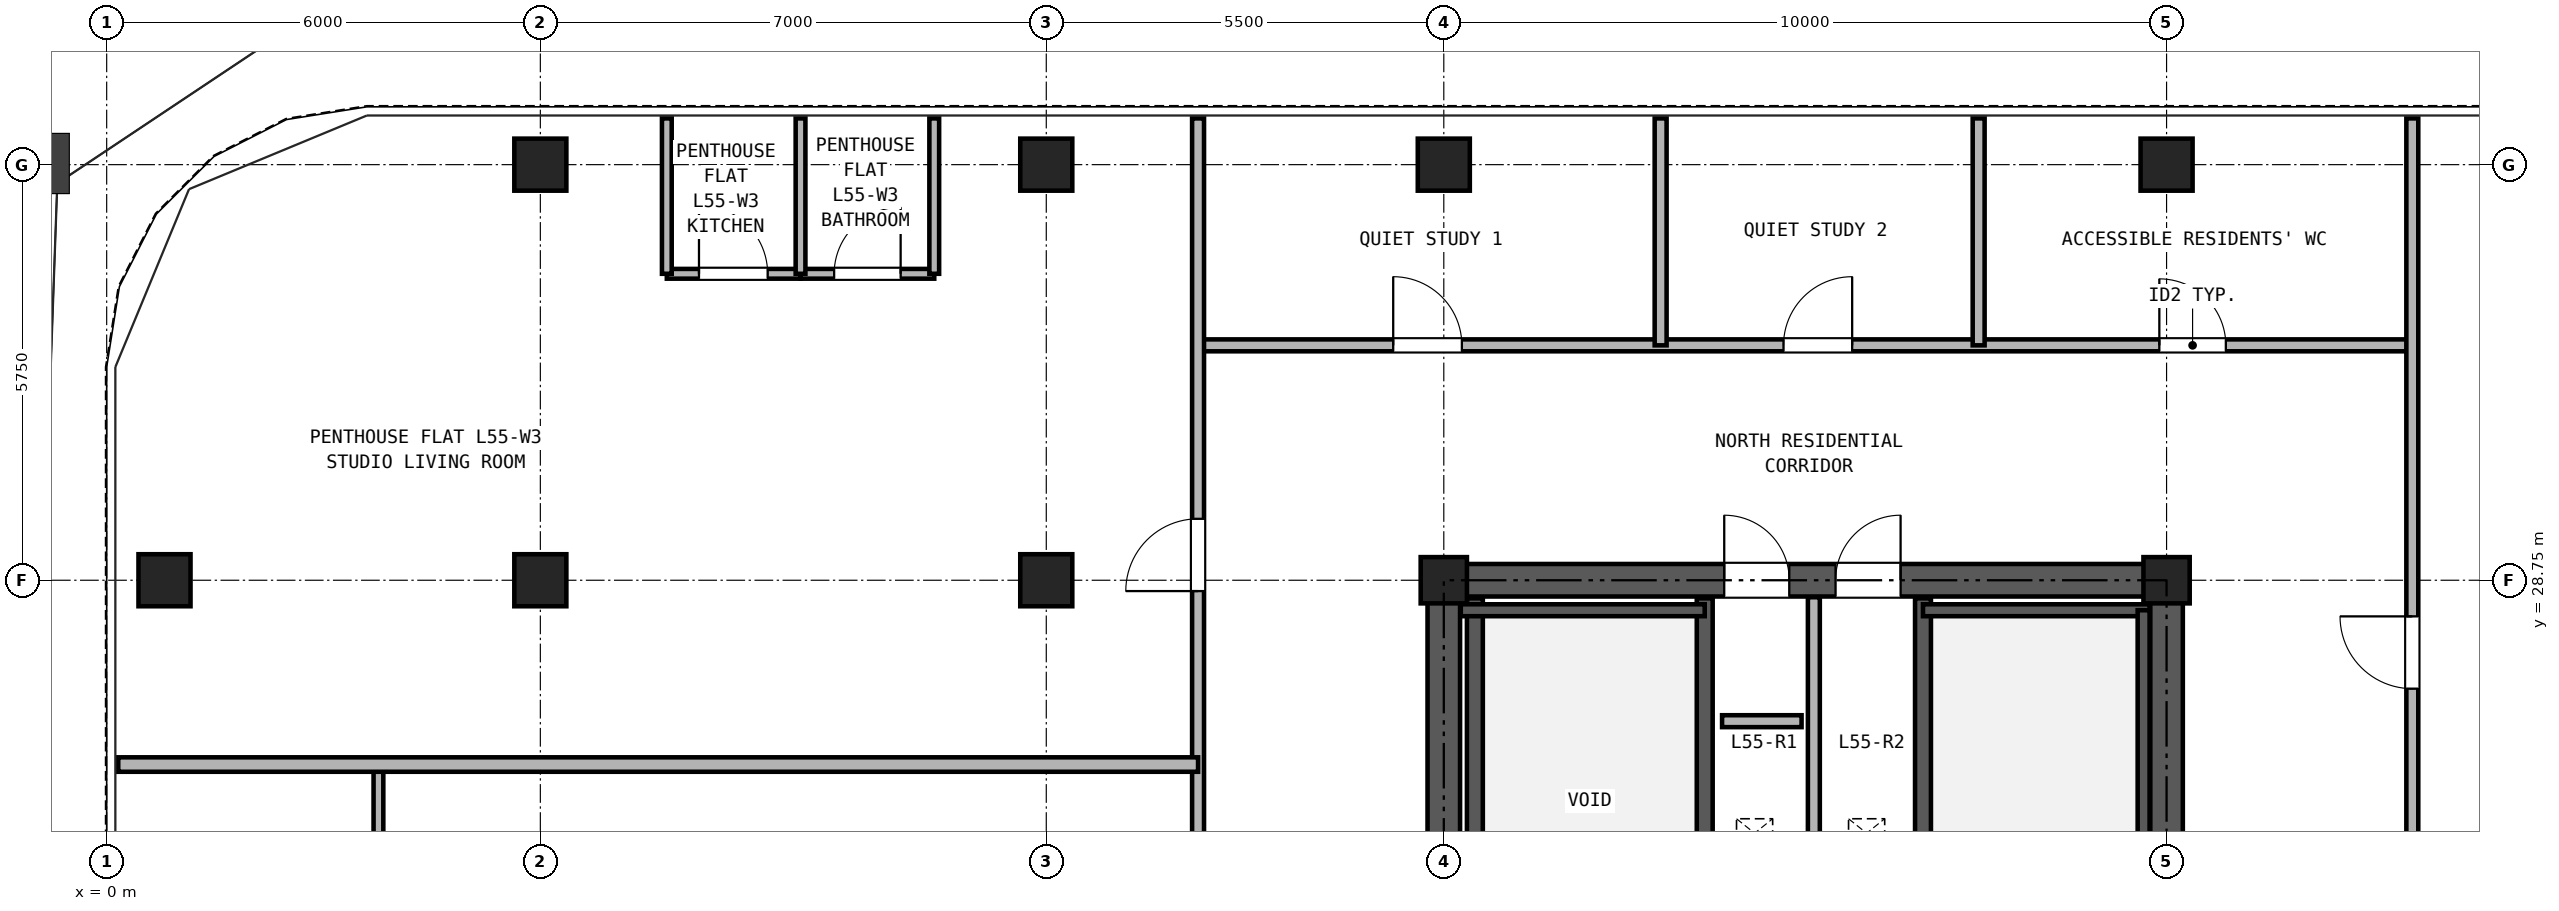
"""IFC4 building model, lengths in metres.
Left out: names, types, materials, properties, quantities, classifications, styles, units other than length and angle.
Written with IfcOpenShell. Run it as: python <this file> out.ifc"""

import sys

from ifc_helpers import new_model, si_unit, direction, frame, frame_2d, origin, origin_2d, place, context, subcontext, project, spatial, rectangle, hollow_rectangle, extrude, source, transform, mapped, element, fill, save


model = new_model("IFC4")
c1 = context("Model", 3, precision=1e-05, world=origin(), true_north=direction((0.0, 1.0)))
c2 = subcontext(c1, "Body", "Model", "MODEL_VIEW")
j1 = project(units=[si_unit("LENGTHUNIT", "METRE"), si_unit("PLANEANGLEUNIT", "RADIAN")], contexts=[c1])
p1 = place(None, origin())
s1 = spatial("IfcSite", under=j1, at=p1, CompositionType="ELEMENT")
p2 = place(p1, origin())
s2 = spatial("IfcBuilding", under=s1, at=p2, CompositionType="ELEMENT")
p3 = place(p2, frame((0.0, 0.0, 196.4)))
s3 = spatial("IfcBuildingStorey", under=s2, at=p3, CompositionType="ELEMENT", Elevation=196.4)
m1 = source(origin(), c2, "Body", "SweptSolid", [
    extrude(hollow_rectangle(XDim=0.72, YDim=0.72, WallThickness=0.04, at=origin_2d()), origin(), (0.0, 0.0, 1.0), 2.95),
])
for number, where, z_axis, x_axis in (
    (1, (6.0, 34.5, 0.0), (0.0, 0.0, 1.0), (1.0, 0.0, 0.0)),
    (2, (13.0, 34.5, 0.0), (0.0, 0.0, 1.0), (1.0, 0.0, 0.0)),
    (3, (18.5, 34.5, 0.0), (0.0, 0.0, 1.0), (1.0, 0.0, 0.0)),
    (4, (28.5, 34.5, 0.0), (0.0, 0.0, 1.0), (1.0, 0.0, 0.0)),
    (5, (0.8, 28.75, 0.0), (0.0, 0.0, 1.0), (1.0, 0.0, 0.0)),
    (6, (6.0, 28.75, 0.0), (0.0, 0.0, 1.0), (1.0, 0.0, 0.0)),
    (7, (13.0, 28.75, 0.0), (0.0, 0.0, 1.0), (1.0, 0.0, 0.0)),
):
    element("IfcColumn", number, at=place(p3, frame(where, z_axis=z_axis, x_axis=x_axis)), inside=s3, PredefinedType="COLUMN", context=c2, shape_type="MappedRepresentation", body=[
        mapped(m1, transform((0.0, 0.0, 0.0), x_axis=(1.0, 0.0, 0.0), y_axis=(0.0, 1.0, 0.0), z_axis=(0.0, 0.0, 1.0), scale=1.0)),
    ])
m2 = source(origin(), c2, "Body", "SweptSolid", [
    extrude(hollow_rectangle(XDim=0.64, YDim=0.64, WallThickness=0.035, at=origin_2d()), origin(), (0.0, 0.0, 1.0), 2.95),
])
for number, where, z_axis, x_axis in (
    (8, (18.5, 28.75, 0.0), (0.0, 0.0, 1.0), (1.0, 0.0, 0.0)),
    (9, (28.5, 28.75, 0.0), (0.0, 0.0, 1.0), (1.0, 0.0, 0.0)),
):
    element("IfcColumn", number, at=place(p3, frame(where, z_axis=z_axis, x_axis=x_axis)), inside=s3, PredefinedType="COLUMN", context=c2, shape_type="MappedRepresentation", body=[
        mapped(m2, transform((0.0, 0.0, 0.0), x_axis=(1.0, 0.0, 0.0), y_axis=(0.0, 1.0, 0.0), z_axis=(0.0, 0.0, 1.0), scale=1.0)),
    ])
p4 = place(p3, frame((18.275, 28.75, 0.0), z_axis=(0.0, 0.0, 1.0), x_axis=(1.0, 0.0, 0.0)))
e10 = element("IfcWall", 10, at=p4, inside=s3, PredefinedType="SHEAR", context=c2, shape_type="SweptSolid", body=[
    extrude(rectangle(XDim=10.45, YDim=0.45, at=frame_2d((5.225, 0.0))), origin(), (0.0, 0.0, 1.0), 2.95),
])
p5 = place(p4, frame((4.105, 0.0, 0.0)))
e11 = element("IfcOpeningElement", 11, at=p5, cuts=e10, PredefinedType="OPENING", context=c2, shape_type="SweptSolid", body=[
    extrude(rectangle(XDim=0.9, YDim=2.05, at=frame_2d((0.45, 1.025))), frame((0.0, 0.235, 0.0), z_axis=(0.0, -1.0, 0.0), x_axis=(1.0, 0.0, 0.0)), (0.0, 0.0, 1.0), 0.47),
])
p6 = place(p4, frame((5.645, 0.0, 0.0)))
e12 = element("IfcOpeningElement", 12, at=p6, cuts=e10, PredefinedType="OPENING", context=c2, shape_type="SweptSolid", body=[
    extrude(rectangle(XDim=0.9, YDim=2.05, at=frame_2d((0.45, 1.025))), frame((0.0, 0.235, 0.0), z_axis=(0.0, -1.0, 0.0), x_axis=(1.0, 0.0, 0.0)), (0.0, 0.0, 1.0), 0.47),
])
p7 = place(p3, frame((18.5, 11.725, 0.0), z_axis=(0.0, 0.0, 1.0), x_axis=(0.0, 1.0, 0.0)))
e13 = element("IfcWall", 13, at=p7, inside=s3, PredefinedType="SHEAR", context=c2, shape_type="SweptSolid", body=[
    extrude(rectangle(XDim=16.8, YDim=0.45, at=frame_2d((8.4, 0.0))), origin(), (0.0, 0.0, 1.0), 2.95),
])
p8 = place(p7, frame((7.425, 0.0, 0.0)))
e14 = element("IfcOpeningElement", 14, at=p8, cuts=e13, PredefinedType="OPENING", context=c2, shape_type="SweptSolid", body=[
    extrude(rectangle(XDim=1.15, YDim=2.2, at=frame_2d((0.575, 1.1))), frame((0.0, 0.235, 0.0), z_axis=(0.0, -1.0, 0.0), x_axis=(1.0, 0.0, 0.0)), (0.0, 0.0, 1.0), 0.47),
])
p9 = place(p3, frame((28.5, 11.725, 0.0), z_axis=(0.0, 0.0, 1.0), x_axis=(0.0, 1.0, 0.0)))
e15 = element("IfcWall", 15, at=p9, inside=s3, PredefinedType="SHEAR", context=c2, shape_type="SweptSolid", body=[
    extrude(rectangle(XDim=16.8, YDim=0.45, at=frame_2d((8.4, 0.0))), origin(), (0.0, 0.0, 1.0), 2.95),
])
p10 = place(p9, frame((7.425, 0.0, 0.0)))
e16 = element("IfcOpeningElement", 16, at=p10, cuts=e15, PredefinedType="OPENING", context=c2, shape_type="SweptSolid", body=[
    extrude(rectangle(XDim=1.15, YDim=2.2, at=frame_2d((0.575, 1.1))), frame((0.0, 0.235, 0.0), z_axis=(0.0, -1.0, 0.0), x_axis=(1.0, 0.0, 0.0)), (0.0, 0.0, 1.0), 0.47),
])
for number, where, z_axis, x_axis in (
    (17, (18.93, 21.39, 0.0), (0.0, 0.0, 1.0), (0.0, 1.0, 0.0)),
    (18, (22.11, 21.39, 0.0), (0.0, 0.0, 1.0), (0.0, 1.0, 0.0)),
    (19, (25.13, 21.39, 0.0), (0.0, 0.0, 1.0), (0.0, 1.0, 0.0)),
):
    element("IfcWall", number, at=place(p3, frame(where, z_axis=z_axis, x_axis=x_axis)), inside=s3, PredefinedType="SOLIDWALL", context=c2, shape_type="SweptSolid", body=[
        extrude(rectangle(XDim=7.11, YDim=0.22, at=frame_2d((3.555, 0.0))), origin(), (0.0, 0.0, 1.0), 2.95),
    ])
p11 = place(p3, frame((18.735, 28.335, 0.0), z_axis=(0.0, 0.0, 1.0), x_axis=(1.0, 0.0, 0.0)))
e20 = element("IfcWall", 20, at=p11, inside=s3, PredefinedType="PARTITIONING", context=c2, shape_type="SweptSolid", body=[
    extrude(rectangle(XDim=3.375, YDim=0.165, at=frame_2d((1.688, 0.0))), origin(), (0.0, 0.0, 1.0), 2.95),
])
p12 = place(p3, frame((25.13, 28.335, 0.0), z_axis=(0.0, 0.0, 1.0), x_axis=(1.0, 0.0, 0.0)))
e21 = element("IfcWall", 21, at=p12, inside=s3, PredefinedType="PARTITIONING", context=c2, shape_type="SweptSolid", body=[
    extrude(rectangle(XDim=3.135, YDim=0.165, at=frame_2d((1.567, 0.0))), origin(), (0.0, 0.0, 1.0), 2.95),
])
p13 = place(p3, frame((28.183, 21.39, 0.0), z_axis=(0.0, 0.0, 1.0), x_axis=(0.0, 1.0, 0.0)))
e22 = element("IfcWall", 22, at=p13, inside=s3, PredefinedType="PARTITIONING", context=c2, shape_type="SweptSolid", body=[
    extrude(rectangle(XDim=6.945, YDim=0.165, at=frame_2d((3.473, 0.0))), origin(), (0.0, 0.0, 1.0), 2.95),
])
p14 = place(p3, frame((23.62, 24.4, 0.0), z_axis=(0.0, 0.0, 1.0), x_axis=(0.0, 1.0, 0.0)))
e23 = element("IfcWall", 23, at=p14, inside=s3, PredefinedType="PARTITIONING", context=c2, shape_type="SweptSolid", body=[
    extrude(rectangle(XDim=4.115, YDim=0.165, at=frame_2d((2.058, 0.0))), origin(), (0.0, 0.0, 1.0), 2.95),
])
p15 = place(p3, frame((15.1, 32.0, 0.0), z_axis=(0.0, 0.0, 1.0), x_axis=(1.0, 0.0, 0.0)))
e24 = element("IfcWall", 24, at=p15, inside=s3, PredefinedType="PARTITIONING", context=c2, shape_type="SweptSolid", body=[
    extrude(rectangle(XDim=16.8, YDim=0.165, at=frame_2d((8.4, 0.0))), origin(), (0.0, 0.0, 1.0), 2.95),
])
p16 = place(p15, frame((2.7, 0.0, 0.0)))
e25 = element("IfcOpeningElement", 25, at=p16, cuts=e24, PredefinedType="OPENING", context=c2, shape_type="SweptSolid", body=[
    extrude(rectangle(XDim=0.95, YDim=2.15, at=frame_2d((0.475, 1.075))), frame((0.0, 0.093, 0.0), z_axis=(0.0, -1.0, 0.0), x_axis=(1.0, 0.0, 0.0)), (0.0, 0.0, 1.0), 0.185),
])
p17 = place(p15, frame((8.1, 0.0, 0.0)))
e26 = element("IfcOpeningElement", 26, at=p17, cuts=e24, PredefinedType="OPENING", context=c2, shape_type="SweptSolid", body=[
    extrude(rectangle(XDim=0.95, YDim=2.15, at=frame_2d((0.475, 1.075))), frame((0.0, 0.093, 0.0), z_axis=(0.0, -1.0, 0.0), x_axis=(1.0, 0.0, 0.0)), (0.0, 0.0, 1.0), 0.185),
])
p18 = place(p15, frame((13.3, 0.0, 0.0)))
e27 = element("IfcOpeningElement", 27, at=p18, cuts=e24, PredefinedType="OPENING", context=c2, shape_type="SweptSolid", body=[
    extrude(rectangle(XDim=0.92, YDim=2.1, at=frame_2d((0.46, 1.05))), frame((0.0, 0.093, 0.0), z_axis=(0.0, -1.0, 0.0), x_axis=(1.0, 0.0, 0.0)), (0.0, 0.0, 1.0), 0.185),
])
p19 = place(p3, frame((15.1, 10.6, 0.0), z_axis=(0.0, 0.0, 1.0), x_axis=(0.0, 1.0, 0.0)))
e28 = element("IfcWall", 28, at=p19, inside=s3, PredefinedType="PARTITIONING", context=c2, shape_type="SweptSolid", body=[
    extrude(rectangle(XDim=24.54, YDim=0.165, at=frame_2d((12.27, 0.0))), origin(), (0.0, 0.0, 1.0), 2.95),
])
p20 = place(p19, frame((3.3, 0.0, 0.0)))
e29 = element("IfcOpeningElement", 29, at=p20, cuts=e28, PredefinedType="OPENING", context=c2, shape_type="SweptSolid", body=[
    extrude(rectangle(XDim=1.0, YDim=2.15, at=frame_2d((0.5, 1.075))), frame((0.0, 0.093, 0.0), z_axis=(0.0, -1.0, 0.0), x_axis=(1.0, 0.0, 0.0)), (0.0, 0.0, 1.0), 0.185),
])
p21 = place(p19, frame((11.1, 0.0, 0.0)))
e30 = element("IfcOpeningElement", 30, at=p21, cuts=e28, PredefinedType="OPENING", context=c2, shape_type="SweptSolid", body=[
    extrude(rectangle(XDim=1.0, YDim=2.15, at=frame_2d((0.5, 1.075))), frame((0.0, 0.093, 0.0), z_axis=(0.0, -1.0, 0.0), x_axis=(1.0, 0.0, 0.0)), (0.0, 0.0, 1.0), 0.185),
])
p22 = place(p19, frame((18.0, 0.0, 0.0)))
e31 = element("IfcOpeningElement", 31, at=p22, cuts=e28, PredefinedType="OPENING", context=c2, shape_type="SweptSolid", body=[
    extrude(rectangle(XDim=1.0, YDim=2.15, at=frame_2d((0.5, 1.075))), frame((0.0, 0.093, 0.0), z_axis=(0.0, -1.0, 0.0), x_axis=(1.0, 0.0, 0.0)), (0.0, 0.0, 1.0), 0.185),
])
p23 = place(p3, frame((31.9, 10.6, 0.0), z_axis=(0.0, 0.0, 1.0), x_axis=(0.0, 1.0, 0.0)))
e32 = element("IfcWall", 32, at=p23, inside=s3, PredefinedType="PARTITIONING", context=c2, shape_type="SweptSolid", body=[
    extrude(rectangle(XDim=24.54, YDim=0.165, at=frame_2d((12.27, 0.0))), origin(), (0.0, 0.0, 1.0), 2.95),
])
p24 = place(p23, frame((5.95, 0.0, 0.0)))
e33 = element("IfcOpeningElement", 33, at=p24, cuts=e32, PredefinedType="OPENING", context=c2, shape_type="SweptSolid", body=[
    extrude(rectangle(XDim=1.0, YDim=2.15, at=frame_2d((0.5, 1.075))), frame((0.0, 0.093, 0.0), z_axis=(0.0, -1.0, 0.0), x_axis=(1.0, 0.0, 0.0)), (0.0, 0.0, 1.0), 0.185),
])
p25 = place(p23, frame((16.65, 0.0, 0.0)))
e34 = element("IfcOpeningElement", 34, at=p25, cuts=e32, PredefinedType="OPENING", context=c2, shape_type="SweptSolid", body=[
    extrude(rectangle(XDim=1.0, YDim=2.15, at=frame_2d((0.5, 1.075))), frame((0.0, 0.093, 0.0), z_axis=(0.0, -1.0, 0.0), x_axis=(1.0, 0.0, 0.0)), (0.0, 0.0, 1.0), 0.185),
])
p26 = place(p3, frame((3.76, 22.06, 0.0), z_axis=(0.0, 0.0, 1.0), x_axis=(0.0, 1.0, 0.0)))
e35 = element("IfcWall", 35, at=p26, inside=s3, PredefinedType="PARTITIONING", context=c2, shape_type="SweptSolid", body=[
    extrude(rectangle(XDim=4.14, YDim=0.135, at=frame_2d((2.07, 0.0))), origin(), (0.0, 0.0, 1.0), 2.95),
])
p27 = place(p26, frame((1.59, 0.0, 0.0)))
e36 = element("IfcOpeningElement", 36, at=p27, cuts=e35, PredefinedType="OPENING", context=c2, shape_type="SweptSolid", body=[
    extrude(rectangle(XDim=0.95, YDim=2.15, at=frame_2d((0.475, 1.075))), frame((0.0, 0.077, 0.0), z_axis=(0.0, -1.0, 0.0), x_axis=(1.0, 0.0, 0.0)), (0.0, 0.0, 1.0), 0.155),
])
p28 = place(p3, frame((0.16, 26.2, 0.0), z_axis=(0.0, 0.0, 1.0), x_axis=(1.0, 0.0, 0.0)))
e37 = element("IfcWall", 37, at=p28, inside=s3, PredefinedType="PARTITIONING", context=c2, shape_type="SweptSolid", body=[
    extrude(rectangle(XDim=14.94, YDim=0.2, at=frame_2d((7.47, 0.0))), origin(), (0.0, 0.0, 1.0), 2.95),
])
p29 = place(p3, frame((7.75, 32.99, 0.0), z_axis=(0.0, 0.0, 1.0), x_axis=(1.0, 0.0, 0.0)))
e38 = element("IfcWall", 38, at=p29, inside=s3, PredefinedType="PARTITIONING", context=c2, shape_type="SweptSolid", body=[
    extrude(rectangle(XDim=1.85, YDim=0.135, at=frame_2d((0.925, 0.0))), origin(), (0.0, 0.0, 1.0), 2.95),
])
p30 = place(p29, frame((0.445, 0.0, 0.0)))
e39 = element("IfcOpeningElement", 39, at=p30, cuts=e38, PredefinedType="OPENING", context=c2, shape_type="SweptSolid", body=[
    extrude(rectangle(XDim=0.95, YDim=2.15, at=frame_2d((0.475, 1.075))), frame((0.0, 0.077, 0.0), z_axis=(0.0, -1.0, 0.0), x_axis=(1.0, 0.0, 0.0)), (0.0, 0.0, 1.0), 0.155),
])
p31 = place(p3, frame((9.6, 32.99, 0.0), z_axis=(0.0, 0.0, 1.0), x_axis=(1.0, 0.0, 0.0)))
e40 = element("IfcWall", 40, at=p31, inside=s3, PredefinedType="PARTITIONING", context=c2, shape_type="SweptSolid", body=[
    extrude(rectangle(XDim=1.85, YDim=0.135, at=frame_2d((0.925, 0.0))), origin(), (0.0, 0.0, 1.0), 2.95),
])
p32 = place(p31, frame((0.465, 0.0, 0.0)))
e41 = element("IfcOpeningElement", 41, at=p32, cuts=e40, PredefinedType="OPENING", context=c2, shape_type="SweptSolid", body=[
    extrude(rectangle(XDim=0.92, YDim=2.1, at=frame_2d((0.46, 1.05))), frame((0.0, 0.077, 0.0), z_axis=(0.0, -1.0, 0.0), x_axis=(1.0, 0.0, 0.0)), (0.0, 0.0, 1.0), 0.155),
])
for number, where, z_axis, x_axis in (
    (42, (7.75, 32.99, 0.0), (0.0, 0.0, 1.0), (0.0, 1.0, 0.0)),
    (43, (9.6, 32.99, 0.0), (0.0, 0.0, 1.0), (0.0, 1.0, 0.0)),
    (44, (11.45, 32.99, 0.0), (0.0, 0.0, 1.0), (0.0, 1.0, 0.0)),
):
    element("IfcWall", number, at=place(p3, frame(where, z_axis=z_axis, x_axis=x_axis)), inside=s3, PredefinedType="PARTITIONING", context=c2, shape_type="SweptSolid", body=[
        extrude(rectangle(XDim=2.15, YDim=0.135, at=frame_2d((1.075, 0.0))), origin(), (0.0, 0.0, 1.0), 2.95),
    ])
for number, where, z_axis, x_axis in (
    (45, (21.5, 32.0, 0.0), (0.0, 0.0, 1.0), (0.0, 1.0, 0.0)),
    (46, (25.9, 32.0, 0.0), (0.0, 0.0, 1.0), (0.0, 1.0, 0.0)),
):
    element("IfcWall", number, at=place(p3, frame(where, z_axis=z_axis, x_axis=x_axis)), inside=s3, PredefinedType="PARTITIONING", context=c2, shape_type="SweptSolid", body=[
        extrude(rectangle(XDim=3.14, YDim=0.165, at=frame_2d((1.57, 0.0))), origin(), (0.0, 0.0, 1.0), 2.95),
    ])
p33 = place(p3, frame((22.35, 26.8, 0.0), z_axis=(0.0, 0.0, 1.0), x_axis=(1.0, 0.0, 0.0)))
e47 = element("IfcWall", 47, at=p33, inside=s3, PredefinedType="PARTITIONING", context=c2, shape_type="SweptSolid", body=[
    extrude(rectangle(XDim=1.1, YDim=0.165, at=frame_2d((0.55, 0.0))), origin(), (0.0, 0.0, 1.0), 2.95),
])
p34 = place(p5, origin())
e48 = element("IfcDoor", 48, at=p34, inside=s3, OperationType="SINGLE_SWING_LEFT", PredefinedType="DOOR", context=c2, shape_type="SweptSolid", body=[
    extrude(rectangle(XDim=0.9, YDim=2.05, at=frame_2d((0.45, 1.025))), frame((0.0, 0.025, 0.0), z_axis=(0.0, -1.0, 0.0), x_axis=(1.0, 0.0, 0.0)), (0.0, 0.0, 1.0), 0.05),
])
fill(e11, e48)
p35 = place(p6, origin())
e49 = element("IfcDoor", 49, at=p35, inside=s3, OperationType="SINGLE_SWING_RIGHT", PredefinedType="DOOR", context=c2, shape_type="SweptSolid", body=[
    extrude(rectangle(XDim=0.9, YDim=2.05, at=frame_2d((0.45, 1.025))), frame((0.0, 0.025, 0.0), z_axis=(0.0, -1.0, 0.0), x_axis=(1.0, 0.0, 0.0)), (0.0, 0.0, 1.0), 0.05),
])
fill(e12, e49)
p36 = place(p30, frame((0.95, 0.0, 0.0), z_axis=(0.0, 0.0, 1.0), x_axis=(-1.0, 0.0, 0.0)))
e50 = element("IfcDoor", 50, at=p36, inside=s3, OperationType="SINGLE_SWING_LEFT", PredefinedType="DOOR", context=c2, shape_type="SweptSolid", body=[
    extrude(rectangle(XDim=0.95, YDim=2.15, at=frame_2d((0.475, 1.075))), frame((0.0, 0.025, 0.0), z_axis=(0.0, -1.0, 0.0), x_axis=(1.0, 0.0, 0.0)), (0.0, 0.0, 1.0), 0.05),
])
fill(e39, e50)
p37 = place(p32, frame((0.92, 0.0, 0.0), z_axis=(0.0, 0.0, 1.0), x_axis=(-1.0, 0.0, 0.0)))
e51 = element("IfcDoor", 51, at=p37, inside=s3, OperationType="SINGLE_SWING_RIGHT", PredefinedType="DOOR", context=c2, shape_type="SweptSolid", body=[
    extrude(rectangle(XDim=0.92, YDim=2.1, at=frame_2d((0.46, 1.05))), frame((0.0, 0.025, 0.0), z_axis=(0.0, -1.0, 0.0), x_axis=(1.0, 0.0, 0.0)), (0.0, 0.0, 1.0), 0.05),
])
fill(e41, e51)
p38 = place(p22, origin())
e52 = element("IfcDoor", 52, at=p38, inside=s3, OperationType="SINGLE_SWING_LEFT", PredefinedType="DOOR", context=c2, shape_type="SweptSolid", body=[
    extrude(rectangle(XDim=1.0, YDim=2.15, at=frame_2d((0.5, 1.075))), frame((0.0, 0.025, 0.0), z_axis=(0.0, -1.0, 0.0), x_axis=(1.0, 0.0, 0.0)), (0.0, 0.0, 1.0), 0.05),
])
fill(e31, e52)
p39 = place(p25, frame((1.0, 0.0, 0.0), z_axis=(0.0, 0.0, 1.0), x_axis=(-1.0, 0.0, 0.0)))
e53 = element("IfcDoor", 53, at=p39, inside=s3, OperationType="SINGLE_SWING_RIGHT", PredefinedType="DOOR", context=c2, shape_type="SweptSolid", body=[
    extrude(rectangle(XDim=1.0, YDim=2.15, at=frame_2d((0.5, 1.075))), frame((0.0, 0.025, 0.0), z_axis=(0.0, -1.0, 0.0), x_axis=(1.0, 0.0, 0.0)), (0.0, 0.0, 1.0), 0.05),
])
fill(e34, e53)
p40 = place(p16, origin())
e54 = element("IfcDoor", 54, at=p40, inside=s3, OperationType="SINGLE_SWING_LEFT", PredefinedType="DOOR", context=c2, shape_type="SweptSolid", body=[
    extrude(rectangle(XDim=0.95, YDim=2.15, at=frame_2d((0.475, 1.075))), frame((0.0, 0.025, 0.0), z_axis=(0.0, -1.0, 0.0), x_axis=(1.0, 0.0, 0.0)), (0.0, 0.0, 1.0), 0.05),
])
fill(e25, e54)
p41 = place(p17, origin())
e55 = element("IfcDoor", 55, at=p41, inside=s3, OperationType="SINGLE_SWING_RIGHT", PredefinedType="DOOR", context=c2, shape_type="SweptSolid", body=[
    extrude(rectangle(XDim=0.95, YDim=2.15, at=frame_2d((0.475, 1.075))), frame((0.0, 0.025, 0.0), z_axis=(0.0, -1.0, 0.0), x_axis=(1.0, 0.0, 0.0)), (0.0, 0.0, 1.0), 0.05),
])
fill(e26, e55)
p42 = place(p18, origin())
e56 = element("IfcDoor", 56, at=p42, inside=s3, OperationType="SINGLE_SWING_LEFT", PredefinedType="DOOR", context=c2, shape_type="SweptSolid", body=[
    extrude(rectangle(XDim=0.92, YDim=2.1, at=frame_2d((0.46, 1.05))), frame((0.0, 0.025, 0.0), z_axis=(0.0, -1.0, 0.0), x_axis=(1.0, 0.0, 0.0)), (0.0, 0.0, 1.0), 0.05),
])
fill(e27, e56)
save(model, sys.argv[1])
